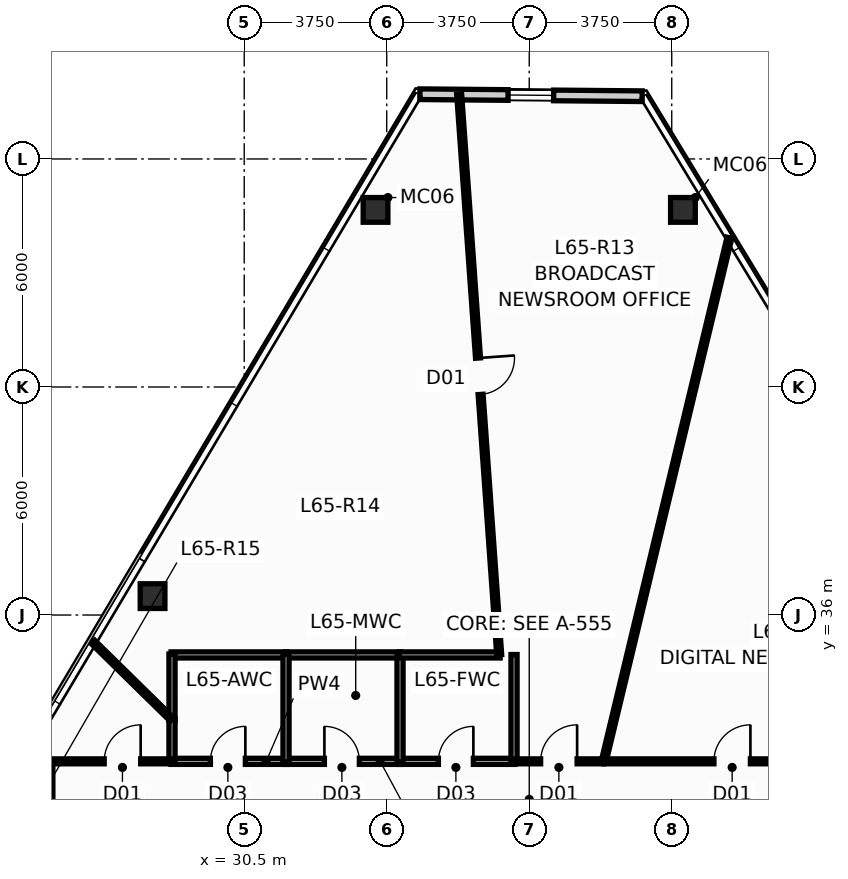
"""IFC4 building model, lengths in metres.
Left out: names, types, materials, properties, quantities, classifications, styles, units other than length and angle.
Written with IfcOpenShell. Run it as: python <this file> out.ifc"""

import sys

from ifc_helpers import new_model, si_unit, direction, frame, frame_2d, origin, origin_2d, place, context, subcontext, project, spatial, rectangle, hollow_rectangle, extrude, source, transform, mapped, element, fill, save


model = new_model("IFC4")
c1 = context("Model", 3, precision=1e-05, world=origin(), true_north=direction((0.0, 1.0)))
c2 = subcontext(c1, "Body", "Model", "MODEL_VIEW")
j1 = project(units=[si_unit("LENGTHUNIT", "METRE"), si_unit("PLANEANGLEUNIT", "RADIAN")], contexts=[c1])
p1 = place(None, origin())
s1 = spatial("IfcSite", under=j1, at=p1, CompositionType="ELEMENT")
p2 = place(p1, origin())
s2 = spatial("IfcBuilding", under=s1, at=p2, CompositionType="ELEMENT")
p3 = place(p2, frame((0.0, 0.0, 248.1)))
s3 = spatial("IfcBuildingStorey", under=s2, at=p3, CompositionType="ELEMENT", Elevation=248.1)
m1 = source(origin(), c2, "Body", "SweptSolid", [
    extrude(hollow_rectangle(XDim=0.65, YDim=0.65, WallThickness=0.04, at=origin_2d()), origin(), (0.0, 0.0, 1.0), 3.651),
])
for number, where, z_axis, x_axis in (
    (1, (42.044, 46.66, 0.0), (-0.024, 0.002, 1.0), (-0.073, -0.997, 0.0)),
    (2, (33.956, 46.66, 0.0), (0.024, 0.002, 1.0), (-0.073, 0.997, 0.0)),
):
    element("IfcColumn", number, at=place(p3, frame(where, z_axis=z_axis, x_axis=x_axis)), inside=s3, PredefinedType="COLUMN", context=c2, shape_type="MappedRepresentation", body=[
        mapped(m1, transform((0.0, 0.0, 0.0), scale=1.0)),
    ])
m2 = source(origin(), c2, "Body", "SweptSolid", [
    extrude(hollow_rectangle(XDim=0.65, YDim=0.65, WallThickness=0.04, at=origin_2d()), origin(), (0.0, 0.0, 1.0), 3.651),
])
p4 = place(p3, frame((28.088, 36.498, 0.0), z_axis=(0.019393993486, -0.006018825565, 0.999793802119), x_axis=(0.296399214872, 0.955064136811, 0.0)))
e3 = element("IfcColumn", 3, at=p4, inside=s3, PredefinedType="COLUMN", context=c2, shape_type="MappedRepresentation", body=[
    mapped(m2, transform((0.0, 0.0, 0.0), scale=1.0)),
])
p5 = place(p3, frame((35.123, 49.704, 0.0), z_axis=(0.0, 0.0, 1.0), x_axis=(0.999960106081, -0.008932314676, 0.0)))
e4 = element("IfcWall", 4, at=p5, inside=s3, PredefinedType="STANDARD", context=c2, shape_type="SweptSolid", body=[
    extrude(rectangle(XDim=5.849, YDim=0.28, at=frame_2d((2.925, 0.0))), origin(), (0.0, 0.0, 1.0), 3.4),
])
p6 = place(p5, frame((2.32, 0.0, 0.9)))
e5 = element("IfcOpeningElement", 5, at=p6, cuts=e4, PredefinedType="OPENING", context=c2, shape_type="SweptSolid", body=[
    extrude(rectangle(XDim=1.2, YDim=1.65, at=frame_2d((0.6, 0.825))), frame((0.0, 0.152, 0.0), z_axis=(0.0, -1.0, 0.0), x_axis=(1.0, 0.0, 0.0)), (0.0, 0.0, 1.0), 0.304),
])
p7 = place(p3, frame((28.575, 32.15, 0.0), z_axis=(0.0, 0.0, 1.0), x_axis=(1.0, 0.0, 0.0)))
e6 = element("IfcWall", 6, at=p7, inside=s3, PredefinedType="PLUMBINGWALL", context=c2, shape_type="SweptSolid", body=[
    extrude(rectangle(XDim=3.05, YDim=0.16, at=frame_2d((1.525, 0.0))), origin(), (0.0, 0.0, 1.0), 3.085),
])
p8 = place(p7, frame((1.035, 0.0, 0.0)))
e7 = element("IfcOpeningElement", 7, at=p8, cuts=e6, PredefinedType="OPENING", context=c2, shape_type="SweptSolid", body=[
    extrude(rectangle(XDim=0.92, YDim=2.1, at=frame_2d((0.46, 1.05))), frame((0.0, 0.092, 0.0), z_axis=(0.0, -1.0, 0.0), x_axis=(1.0, 0.0, 0.0)), (0.0, 0.0, 1.0), 0.184),
])
p9 = place(p3, frame((31.575, 32.15, 0.0), z_axis=(0.0, 0.0, 1.0), x_axis=(1.0, 0.0, 0.0)))
e8 = element("IfcWall", 8, at=p9, inside=s3, PredefinedType="PLUMBINGWALL", context=c2, shape_type="SweptSolid", body=[
    extrude(rectangle(XDim=3.05, YDim=0.16, at=frame_2d((1.525, 0.0))), origin(), (0.0, 0.0, 1.0), 3.085),
])
p10 = place(p9, frame((1.035, 0.0, 0.0)))
e9 = element("IfcOpeningElement", 9, at=p10, cuts=e8, PredefinedType="OPENING", context=c2, shape_type="SweptSolid", body=[
    extrude(rectangle(XDim=0.92, YDim=2.1, at=frame_2d((0.46, 1.05))), frame((0.0, 0.092, 0.0), z_axis=(0.0, -1.0, 0.0), x_axis=(1.0, 0.0, 0.0)), (0.0, 0.0, 1.0), 0.184),
])
p11 = place(p3, frame((34.575, 32.15, 0.0), z_axis=(0.0, 0.0, 1.0), x_axis=(1.0, 0.0, 0.0)))
e10 = element("IfcWall", 10, at=p11, inside=s3, PredefinedType="PLUMBINGWALL", context=c2, shape_type="SweptSolid", body=[
    extrude(rectangle(XDim=3.05, YDim=0.16, at=frame_2d((1.525, 0.0))), origin(), (0.0, 0.0, 1.0), 3.085),
])
p12 = place(p11, frame((1.035, 0.0, 0.0)))
e11 = element("IfcOpeningElement", 11, at=p12, cuts=e10, PredefinedType="OPENING", context=c2, shape_type="SweptSolid", body=[
    extrude(rectangle(XDim=0.92, YDim=2.1, at=frame_2d((0.46, 1.05))), frame((0.0, 0.092, 0.0), z_axis=(0.0, -1.0, 0.0), x_axis=(1.0, 0.0, 0.0)), (0.0, 0.0, 1.0), 0.184),
])
for number, where, z_axis, x_axis in (
    (12, (28.575, 34.95, 0.0), (0.0, 0.0, 1.0), (1.0, 0.0, 0.0)),
    (13, (31.575, 34.95, 0.0), (0.0, 0.0, 1.0), (1.0, 0.0, 0.0)),
):
    element("IfcWall", number, at=place(p3, frame(where, z_axis=z_axis, x_axis=x_axis)), inside=s3, PredefinedType="PLUMBINGWALL", context=c2, shape_type="SweptSolid", body=[
        extrude(rectangle(XDim=3.05, YDim=0.16, at=frame_2d((1.525, 0.0))), origin(), (0.0, 0.0, 1.0), 3.085),
    ])
p13 = place(p3, frame((31.6, 32.125, 0.0), z_axis=(0.0, 0.0, 1.0), x_axis=(0.0, 1.0, 0.0)))
e14 = element("IfcWall", 14, at=p13, inside=s3, PredefinedType="PLUMBINGWALL", context=c2, shape_type="SweptSolid", body=[
    extrude(rectangle(XDim=2.85, YDim=0.16, at=frame_2d((1.425, 0.0))), origin(), (0.0, 0.0, 1.0), 2.985),
])
p14 = place(p3, frame((34.6, 32.125, 0.0), z_axis=(0.0, 0.0, 1.0), x_axis=(0.0, 1.0, 0.0)))
e15 = element("IfcWall", 15, at=p14, inside=s3, PredefinedType="PLUMBINGWALL", context=c2, shape_type="SweptSolid", body=[
    extrude(rectangle(XDim=2.85, YDim=0.16, at=frame_2d((1.425, 0.0))), origin(), (0.0, 0.0, 1.0), 3.4),
])
p15 = place(p3, frame((37.6, 32.125, 0.0), z_axis=(0.0, 0.0, 1.0), x_axis=(0.0, 1.0, 0.0)))
e16 = element("IfcWall", 16, at=p15, inside=s3, PredefinedType="PLUMBINGWALL", context=c2, shape_type="SweptSolid", body=[
    extrude(rectangle(XDim=2.835, YDim=0.16, at=frame_2d((1.417, 0.0))), origin(), (0.0, 0.0, 1.0), 3.4),
])
p16 = place(p3, frame((34.575, 34.95, 0.0), z_axis=(0.0, 0.0, 1.0), x_axis=(1.0, 0.0, 0.0)))
e17 = element("IfcWall", 17, at=p16, inside=s3, PredefinedType="PLUMBINGWALL", context=c2, shape_type="SweptSolid", body=[
    extrude(rectangle(XDim=2.66, YDim=0.16, at=frame_2d((1.33, 0.0))), origin(), (0.0, 0.0, 1.0), 3.085),
])
p17 = place(p3, frame((28.6, 33.225, 0.0), z_axis=(0.0, 0.0, 1.0), x_axis=(0.0, 1.0, 0.0)))
e18 = element("IfcWall", 18, at=p17, inside=s3, PredefinedType="PLUMBINGWALL", context=c2, shape_type="SweptSolid", body=[
    extrude(rectangle(XDim=1.75, YDim=0.16, at=frame_2d((0.875, 0.0))), origin(), (0.0, 0.0, 1.0), 2.985),
])
p18 = place(p3, frame((28.6, 32.125, 0.0), z_axis=(0.0, 0.0, 1.0), x_axis=(0.0, 1.0, 0.0)))
e19 = element("IfcWall", 19, at=p18, inside=s3, PredefinedType="PLUMBINGWALL", context=c2, shape_type="SweptSolid", body=[
    extrude(rectangle(XDim=1.15, YDim=0.16, at=frame_2d((0.575, 0.0))), origin(), (0.0, 0.0, 1.0), 3.4),
])
p19 = place(p3, frame((36.156, 49.7, 0.0), z_axis=(0.0, 0.0, 1.0), x_axis=(0.071265829402, -0.997457358266, 0.0)))
e20 = element("IfcWall", 20, at=p19, inside=s3, PredefinedType="PARTITIONING", context=c2, shape_type="SweptSolid", body=[
    extrude(rectangle(XDim=14.782, YDim=0.13, at=frame_2d((7.391, 0.0))), origin(), (0.0, 0.0, 1.0), 3.4),
])
p20 = place(p19, frame((6.956, 0.0, 0.0)))
e21 = element("IfcOpeningElement", 21, at=p20, cuts=e20, PredefinedType="OPENING", context=c2, shape_type="SweptSolid", body=[
    extrude(rectangle(XDim=0.96, YDim=2.15, at=frame_2d((0.48, 1.075))), frame((0.0, 0.077, 0.0), z_axis=(0.0, -1.0, 0.0), x_axis=(1.0, 0.0, 0.0)), (0.0, 0.0, 1.0), 0.154),
])
p21 = place(p3, frame((39.961, 32.155, 0.0), z_axis=(0.0, 0.0, 1.0), x_axis=(0.233500733083, 0.972356625755, 0.0)))
e22 = element("IfcWall", 22, at=p21, inside=s3, PredefinedType="PARTITIONING", context=c2, shape_type="SweptSolid", body=[
    extrude(rectangle(XDim=14.163, YDim=0.13, at=frame_2d((7.082, 0.0))), origin(), (0.0, 0.0, 1.0), 3.4),
])
p22 = place(p3, frame((39.965, 32.15, 0.0), z_axis=(0.0, 0.0, 1.0), x_axis=(1.0, 0.0, 0.0)))
e23 = element("IfcWall", 23, at=p22, inside=s3, PredefinedType="PARTITIONING", context=c2, shape_type="SweptSolid", body=[
    extrude(rectangle(XDim=6.75, YDim=0.13, at=frame_2d((3.375, 0.0))), origin(), (0.0, 0.0, 1.0), 3.085),
])
p23 = place(p22, frame((2.895, 0.0, 0.0)))
e24 = element("IfcOpeningElement", 24, at=p23, cuts=e23, PredefinedType="OPENING", context=c2, shape_type="SweptSolid", body=[
    extrude(rectangle(XDim=0.96, YDim=2.15, at=frame_2d((0.48, 1.075))), frame((0.0, 0.077, 0.0), z_axis=(0.0, -1.0, 0.0), x_axis=(1.0, 0.0, 0.0)), (0.0, 0.0, 1.0), 0.154),
])
p24 = place(p3, frame((25.4, 28.345, 0.0), z_axis=(0.0, 0.0, 1.0), x_axis=(0.0, 1.0, 0.0)))
e25 = element("IfcWall", 25, at=p24, inside=s3, PredefinedType="PARTITIONING", context=c2, shape_type="SweptSolid", body=[
    extrude(rectangle(XDim=3.8, YDim=0.13, at=frame_2d((1.9, 0.0))), origin(), (0.0, 0.0, 1.0), 3.4),
])
p25 = place(p3, frame((24.676, 32.15, 0.0), z_axis=(0.0, 0.0, 1.0), x_axis=(1.0, 0.0, 0.0)))
e26 = element("IfcWall", 26, at=p25, inside=s3, PredefinedType="PARTITIONING", context=c2, shape_type="SweptSolid", body=[
    extrude(rectangle(XDim=3.919, YDim=0.13, at=frame_2d((1.96, 0.0))), origin(), (0.0, 0.0, 1.0), 3.4),
])
p26 = place(p25, frame((2.14, 0.0, 0.0)))
e27 = element("IfcOpeningElement", 27, at=p26, cuts=e26, PredefinedType="OPENING", context=c2, shape_type="SweptSolid", body=[
    extrude(rectangle(XDim=0.96, YDim=2.15, at=frame_2d((0.48, 1.075))), frame((0.0, 0.077, 0.0), z_axis=(0.0, -1.0, 0.0), x_axis=(1.0, 0.0, 0.0)), (0.0, 0.0, 1.0), 0.154),
])
p27 = place(p3, frame((26.518, 35.293, 0.0), z_axis=(0.0, 0.0, 1.0), x_axis=(0.713701169146, -0.700450313127, 0.0)))
e28 = element("IfcWall", 28, at=p27, inside=s3, PredefinedType="PARTITIONING", context=c2, shape_type="SweptSolid", body=[
    extrude(rectangle(XDim=2.911, YDim=0.13, at=frame_2d((1.456, 0.0))), origin(), (0.0, 0.0, 1.0), 3.4),
])
p28 = place(p3, frame((37.605, 32.15, 0.0), z_axis=(0.0, 0.0, 1.0), x_axis=(1.0, 0.0, 0.0)))
e29 = element("IfcWall", 29, at=p28, inside=s3, PredefinedType="PARTITIONING", context=c2, shape_type="SweptSolid", body=[
    extrude(rectangle(XDim=2.35, YDim=0.13, at=frame_2d((1.175, 0.0))), origin(), (0.0, 0.0, 1.0), 3.085),
])
p29 = place(p28, frame((0.695, 0.0, 0.0)))
e30 = element("IfcOpeningElement", 30, at=p29, cuts=e29, PredefinedType="OPENING", context=c2, shape_type="SweptSolid", body=[
    extrude(rectangle(XDim=0.96, YDim=2.15, at=frame_2d((0.48, 1.075))), frame((0.0, 0.077, 0.0), z_axis=(0.0, -1.0, 0.0), x_axis=(1.0, 0.0, 0.0)), (0.0, 0.0, 1.0), 0.154),
])
p30 = place(p6, origin())
e31 = element("IfcWindow", 31, at=p30, inside=s3, PartitioningType="SINGLE_PANEL", PredefinedType="WINDOW", context=c2, shape_type="SweptSolid", body=[
    extrude(rectangle(XDim=1.2, YDim=1.65, at=frame_2d((0.6, 0.825))), frame((0.0, 0.03, 0.0), z_axis=(0.0, -1.0, 0.0), x_axis=(1.0, 0.0, 0.0)), (0.0, 0.0, 1.0), 0.06),
])
fill(e5, e31)
p31 = place(p8, origin())
e32 = element("IfcDoor", 32, at=p31, inside=s3, OperationType="SINGLE_SWING_RIGHT", PredefinedType="DOOR", context=c2, shape_type="SweptSolid", body=[
    extrude(rectangle(XDim=0.92, YDim=2.1, at=frame_2d((0.46, 1.05))), frame((0.0, 0.025, 0.0), z_axis=(0.0, -1.0, 0.0), x_axis=(1.0, 0.0, 0.0)), (0.0, 0.0, 1.0), 0.05),
])
fill(e7, e32)
p32 = place(p10, origin())
e33 = element("IfcDoor", 33, at=p32, inside=s3, OperationType="SINGLE_SWING_LEFT", PredefinedType="DOOR", context=c2, shape_type="SweptSolid", body=[
    extrude(rectangle(XDim=0.92, YDim=2.1, at=frame_2d((0.46, 1.05))), frame((0.0, 0.025, 0.0), z_axis=(0.0, -1.0, 0.0), x_axis=(1.0, 0.0, 0.0)), (0.0, 0.0, 1.0), 0.05),
])
fill(e9, e33)
p33 = place(p12, origin())
e34 = element("IfcDoor", 34, at=p33, inside=s3, OperationType="SINGLE_SWING_RIGHT", PredefinedType="DOOR", context=c2, shape_type="SweptSolid", body=[
    extrude(rectangle(XDim=0.92, YDim=2.1, at=frame_2d((0.46, 1.05))), frame((0.0, 0.025, 0.0), z_axis=(0.0, -1.0, 0.0), x_axis=(1.0, 0.0, 0.0)), (0.0, 0.0, 1.0), 0.05),
])
fill(e11, e34)
p34 = place(p20, origin())
e35 = element("IfcDoor", 35, at=p34, inside=s3, OperationType="SINGLE_SWING_LEFT", PredefinedType="DOOR", context=c2, shape_type="SweptSolid", body=[
    extrude(rectangle(XDim=0.96, YDim=2.15, at=frame_2d((0.48, 1.075))), frame((0.0, 0.025, 0.0), z_axis=(0.0, -1.0, 0.0), x_axis=(1.0, 0.0, 0.0)), (0.0, 0.0, 1.0), 0.05),
])
fill(e21, e35)
p35 = place(p23, origin())
e36 = element("IfcDoor", 36, at=p35, inside=s3, OperationType="SINGLE_SWING_RIGHT", PredefinedType="DOOR", context=c2, shape_type="SweptSolid", body=[
    extrude(rectangle(XDim=0.96, YDim=2.15, at=frame_2d((0.48, 1.075))), frame((0.0, 0.025, 0.0), z_axis=(0.0, -1.0, 0.0), x_axis=(1.0, 0.0, 0.0)), (0.0, 0.0, 1.0), 0.05),
])
fill(e24, e36)
p36 = place(p26, origin())
e37 = element("IfcDoor", 37, at=p36, inside=s3, OperationType="SINGLE_SWING_RIGHT", PredefinedType="DOOR", context=c2, shape_type="SweptSolid", body=[
    extrude(rectangle(XDim=0.96, YDim=2.15, at=frame_2d((0.48, 1.075))), frame((0.0, 0.025, 0.0), z_axis=(0.0, -1.0, 0.0), x_axis=(1.0, 0.0, 0.0)), (0.0, 0.0, 1.0), 0.05),
])
fill(e27, e37)
p37 = place(p29, origin())
e38 = element("IfcDoor", 38, at=p37, inside=s3, OperationType="SINGLE_SWING_RIGHT", PredefinedType="DOOR", context=c2, shape_type="SweptSolid", body=[
    extrude(rectangle(XDim=0.96, YDim=2.15, at=frame_2d((0.48, 1.075))), frame((0.0, 0.025, 0.0), z_axis=(0.0, -1.0, 0.0), x_axis=(1.0, 0.0, 0.0)), (0.0, 0.0, 1.0), 0.05),
])
fill(e30, e38)
save(model, sys.argv[1])
